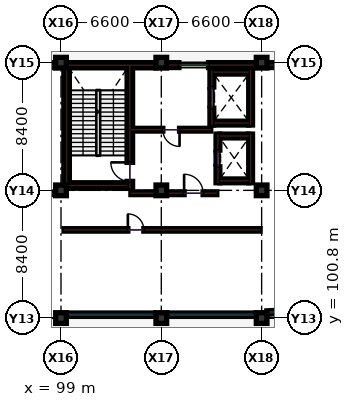
"""IFC4 building model, lengths in metres.
Left out: names, types, materials, properties, quantities, classifications, styles, units other than length and angle.
Written with IfcOpenShell. Run it as: python <this file> out.ifc"""

import sys

from ifc_helpers import new_model, si_unit, direction, frame, frame_2d, origin, origin_2d, place, context, subcontext, project, spatial, rectangle, extrude, element, fill, save


model = new_model("IFC4")
c1 = context("Model", 3, precision=1e-05, world=origin(), true_north=direction((0.0, 1.0)))
c2 = subcontext(c1, "Body", "Model", "MODEL_VIEW")
j1 = project(units=[si_unit("LENGTHUNIT", "METRE"), si_unit("PLANEANGLEUNIT", "RADIAN")], contexts=[c1])
p1 = place(None, origin())
s1 = spatial("IfcSite", under=j1, at=p1, CompositionType="ELEMENT")
p2 = place(p1, origin())
s2 = spatial("IfcBuilding", under=s1, at=p2, CompositionType="ELEMENT")
p3 = place(p2, origin())
s3 = spatial("IfcBuildingStorey", under=s2, at=p3, CompositionType="ELEMENT", Elevation=0.0)
for number, where, z_axis, x_axis in (
    (1, (99.0, 100.8, 0.0), (0.0, 0.0, 1.0), (1.0, 0.0, 0.0)),
    (2, (99.0, 109.2, 0.0), (0.0, 0.0, 1.0), (1.0, 0.0, 0.0)),
    (3, (99.0, 117.6, 0.0), (0.0, 0.0, 1.0), (1.0, 0.0, 0.0)),
    (4, (105.6, 100.8, 0.0), (0.0, 0.0, 1.0), (1.0, 0.0, 0.0)),
    (5, (105.6, 109.2, 0.0), (0.0, 0.0, 1.0), (1.0, 0.0, 0.0)),
    (6, (105.6, 117.6, 0.0), (0.0, 0.0, 1.0), (1.0, 0.0, 0.0)),
    (7, (112.2, 100.8, 0.0), (0.0, 0.0, 1.0), (1.0, 0.0, 0.0)),
    (8, (112.2, 109.2, 0.0), (0.0, 0.0, 1.0), (1.0, 0.0, 0.0)),
    (9, (112.2, 117.6, 0.0), (0.0, 0.0, 1.0), (1.0, 0.0, 0.0)),
):
    element("IfcColumn", number, at=place(p3, frame(where, z_axis=z_axis, x_axis=x_axis)), inside=s3, PredefinedType="COLUMN", context=c2, shape_type="SweptSolid", body=[
        extrude(rectangle(XDim=0.7, YDim=0.7, at=origin_2d()), origin(), (0.0, 0.0, 1.0), 5.4),
    ])
p4 = place(p3, frame((92.85, 109.0, 0.0), z_axis=(0.0, 0.0, 1.0), x_axis=(1.0, 0.0, 0.0)))
e10 = element("IfcWall", 10, at=p4, inside=s3, PredefinedType="PARTITIONING", context=c2, shape_type="SweptSolid", body=[
    extrude(rectangle(XDim=6.45, YDim=0.16, at=frame_2d((3.225, 0.0))), origin(), (0.0, 0.0, 1.0), 4.235),
])
p5 = place(p3, frame((99.2, 106.6, 0.0), z_axis=(0.0, 0.0, 1.0), x_axis=(1.0, 0.0, 0.0)))
e11 = element("IfcWall", 11, at=p5, inside=s3, PredefinedType="PARTITIONING", context=c2, shape_type="SweptSolid", body=[
    extrude(rectangle(XDim=12.9, YDim=0.16, at=frame_2d((6.45, 0.0))), origin(), (0.0, 0.0, 1.0), 4.25),
])
p6 = place(p5, frame((4.2, 0.0, 0.0)))
e12 = element("IfcOpeningElement", 12, at=p6, cuts=e11, PredefinedType="OPENING", context=c2, shape_type="SweptSolid", body=[
    extrude(rectangle(XDim=1.05, YDim=2.15, at=frame_2d((0.525, 1.075))), frame((0.0, 0.09, 0.0), z_axis=(0.0, -1.0, 0.0), x_axis=(1.0, 0.0, 0.0)), (0.0, 0.0, 1.0), 0.18),
])
p7 = place(p3, frame((98.655, 117.44, 0.0), z_axis=(0.0, 0.0, 1.0), x_axis=(-1.0, 0.0, 0.0)))
e13 = element("IfcWall", 13, at=p7, inside=s3, PredefinedType="SOLIDWALL", context=c2, shape_type="SweptSolid", body=[
    extrude(rectangle(XDim=5.91, YDim=0.32, at=frame_2d((2.955, 0.0))), origin(), (0.0, 0.0, 1.0), 4.385),
])
p8 = place(p7, frame((2.055, 0.0, 0.0)))
e14 = element("IfcOpeningElement", 14, at=p8, cuts=e13, PredefinedType="OPENING", context=c2, shape_type="SweptSolid", body=[
    extrude(rectangle(XDim=1.8, YDim=2.2, at=frame_2d((0.9, 1.1))), frame((0.0, 0.17, 0.0), z_axis=(0.0, -1.0, 0.0), x_axis=(1.0, 0.0, 0.0)), (0.0, 0.0, 1.0), 0.34),
])
p9 = place(p3, frame((105.255, 117.43, 0.0), z_axis=(0.0, 0.0, 1.0), x_axis=(-1.0, 0.0, 0.0)))
e15 = element("IfcWall", 15, at=p9, inside=s3, PredefinedType="SHEAR", context=c2, shape_type="SweptSolid", body=[
    extrude(rectangle(XDim=5.91, YDim=0.34, at=frame_2d((2.955, 0.0))), origin(), (0.0, 0.0, 1.0), 5.1),
])
p10 = place(p3, frame((111.855, 117.44, 0.0), z_axis=(0.0, 0.0, 1.0), x_axis=(-1.0, 0.0, 0.0)))
e16 = element("IfcWall", 16, at=p10, inside=s3, PredefinedType="SOLIDWALL", context=c2, shape_type="SweptSolid", body=[
    extrude(rectangle(XDim=5.91, YDim=0.32, at=frame_2d((2.955, 0.0))), origin(), (0.0, 0.0, 1.0), 4.385),
])
p11 = place(p10, frame((3.15, 0.0, 0.95)))
e17 = element("IfcOpeningElement", 17, at=p11, cuts=e16, PredefinedType="OPENING", context=c2, shape_type="SweptSolid", body=[
    extrude(rectangle(XDim=1.95, YDim=1.55, at=frame_2d((0.975, 0.775))), frame((0.0, 0.17, 0.0), z_axis=(0.0, -1.0, 0.0), x_axis=(1.0, 0.0, 0.0)), (0.0, 0.0, 1.0), 0.34),
])
p12 = place(p3, frame((118.455, 117.44, 0.0), z_axis=(0.0, 0.0, 1.0), x_axis=(-1.0, 0.0, 0.0)))
e18 = element("IfcWall", 18, at=p12, inside=s3, PredefinedType="SOLIDWALL", context=c2, shape_type="SweptSolid", body=[
    extrude(rectangle(XDim=5.91, YDim=0.32, at=frame_2d((2.955, 0.0))), origin(), (0.0, 0.0, 1.0), 4.385),
])
p13 = place(p12, frame((1.83, 0.0, 0.95)))
e19 = element("IfcOpeningElement", 19, at=p13, cuts=e18, PredefinedType="OPENING", context=c2, shape_type="SweptSolid", body=[
    extrude(rectangle(XDim=2.25, YDim=1.55, at=frame_2d((1.125, 0.775))), frame((0.0, 0.17, 0.0), z_axis=(0.0, -1.0, 0.0), x_axis=(1.0, 0.0, 0.0)), (0.0, 0.0, 1.0), 0.34),
])
p14 = place(p3, frame((99.5, 101.02, 0.0), z_axis=(0.0, 0.0, 1.0), x_axis=(1.0, 0.0, 0.0)))
e20 = element("IfcWall", 20, at=p14, inside=s3, PredefinedType="SOLIDWALL", context=c2, shape_type="SweptSolid", body=[
    extrude(rectangle(XDim=5.6, YDim=0.22, at=frame_2d((2.8, 0.0))), origin(), (0.0, 0.0, 1.0), 0.85),
])
p15 = place(p3, frame((106.1, 101.02, 0.0), z_axis=(0.0, 0.0, 1.0), x_axis=(1.0, 0.0, 0.0)))
e21 = element("IfcWall", 21, at=p15, inside=s3, PredefinedType="SOLIDWALL", context=c2, shape_type="SweptSolid", body=[
    extrude(rectangle(XDim=5.6, YDim=0.22, at=frame_2d((2.8, 0.0))), origin(), (0.0, 0.0, 1.0), 0.85),
])
p16 = place(p3, frame((112.55, 101.165, 0.0), z_axis=(0.0, 0.0, 1.0), x_axis=(0.998952546821, 0.045758159928, 0.0)))
e22 = element("IfcWall", 22, at=p16, inside=s3, PredefinedType="SOLIDWALL", context=c2, shape_type="SweptSolid", body=[
    extrude(rectangle(XDim=4.044, YDim=0.22, at=frame_2d((2.022, 0.0))), origin(), (0.0, 0.0, 1.0), 0.85),
])
p17 = place(p3, frame((99.37, 109.34, 0.0), z_axis=(0.0, 0.0, 1.0), x_axis=(0.0, 1.0, 0.0)))
e23 = element("IfcWall", 23, at=p17, inside=s3, PredefinedType="SHEAR", context=c2, shape_type="SweptSolid", body=[
    extrude(rectangle(XDim=8.09, YDim=0.36, at=frame_2d((4.045, 0.0))), origin(), (0.0, 0.0, 1.0), 5.1),
])
p18 = place(p3, frame((103.53, 109.34, 0.0), z_axis=(0.0, 0.0, 1.0), x_axis=(0.0, 1.0, 0.0)))
e24 = element("IfcWall", 24, at=p18, inside=s3, PredefinedType="SHEAR", context=c2, shape_type="SweptSolid", body=[
    extrude(rectangle(XDim=8.09, YDim=0.36, at=frame_2d((4.045, 0.0))), origin(), (0.0, 0.0, 1.0), 5.1),
])
p19 = place(p18, frame((0.45, 0.0, 0.0)))
e25 = element("IfcOpeningElement", 25, at=p19, cuts=e24, PredefinedType="OPENING", context=c2, shape_type="SweptSolid", body=[
    extrude(rectangle(XDim=1.25, YDim=2.15, at=frame_2d((0.625, 1.075))), frame((0.0, 0.19, 0.0), z_axis=(0.0, -1.0, 0.0), x_axis=(1.0, 0.0, 0.0)), (0.0, 0.0, 1.0), 0.38),
])
p20 = place(p3, frame((99.55, 109.52, 0.0), z_axis=(0.0, 0.0, 1.0), x_axis=(1.0, 0.0, 0.0)))
e26 = element("IfcWall", 26, at=p20, inside=s3, PredefinedType="SHEAR", context=c2, shape_type="SweptSolid", body=[
    extrude(rectangle(XDim=3.8, YDim=0.36, at=frame_2d((1.9, 0.0))), origin(), (0.0, 0.0, 1.0), 5.1),
])
p21 = place(p3, frame((109.325, 109.7, 0.0), z_axis=(0.0, 0.0, 1.0), x_axis=(0.0, 1.0, 0.0)))
e27 = element("IfcWall", 27, at=p21, inside=s3, PredefinedType="SHEAR", context=c2, shape_type="SweptSolid", body=[
    extrude(rectangle(XDim=3.2, YDim=0.25, at=frame_2d((1.6, 0.0))), origin(), (0.0, 0.0, 1.0), 5.1),
])
p22 = place(p21, frame((1.05, 0.0, 0.0)))
e28 = element("IfcOpeningElement", 28, at=p22, cuts=e27, PredefinedType="OPENING", context=c2, shape_type="SweptSolid", body=[
    extrude(rectangle(XDim=1.1, YDim=2.15, at=frame_2d((0.55, 1.075))), frame((0.0, 0.135, 0.0), z_axis=(0.0, -1.0, 0.0), x_axis=(1.0, 0.0, 0.0)), (0.0, 0.0, 1.0), 0.27),
])
p23 = place(p3, frame((111.475, 109.7, 0.0), z_axis=(0.0, 0.0, 1.0), x_axis=(0.0, 1.0, 0.0)))
e29 = element("IfcWall", 29, at=p23, inside=s3, PredefinedType="SHEAR", context=c2, shape_type="SweptSolid", body=[
    extrude(rectangle(XDim=3.2, YDim=0.25, at=frame_2d((1.6, 0.0))), origin(), (0.0, 0.0, 1.0), 5.1),
])
for number, where, z_axis, x_axis in (
    (30, (109.45, 109.825, 0.0), (0.0, 0.0, 1.0), (1.0, 0.0, 0.0)),
    (31, (109.45, 112.775, 0.0), (0.0, 0.0, 1.0), (1.0, 0.0, 0.0)),
):
    element("IfcWall", number, at=place(p3, frame(where, z_axis=z_axis, x_axis=x_axis)), inside=s3, PredefinedType="SHEAR", context=c2, shape_type="SweptSolid", body=[
        extrude(rectangle(XDim=1.9, YDim=0.25, at=frame_2d((0.95, 0.0))), origin(), (0.0, 0.0, 1.0), 5.1),
    ])
p24 = place(p3, frame((108.925, 113.5, 0.0), z_axis=(0.0, 0.0, 1.0), x_axis=(0.0, 1.0, 0.0)))
e32 = element("IfcWall", 32, at=p24, inside=s3, PredefinedType="SHEAR", context=c2, shape_type="SweptSolid", body=[
    extrude(rectangle(XDim=3.6, YDim=0.25, at=frame_2d((1.8, 0.0))), origin(), (0.0, 0.0, 1.0), 5.1),
])
p25 = place(p24, frame((1.1, 0.0, 0.0)))
e33 = element("IfcOpeningElement", 33, at=p25, cuts=e32, PredefinedType="OPENING", context=c2, shape_type="SweptSolid", body=[
    extrude(rectangle(XDim=1.4, YDim=2.2, at=frame_2d((0.7, 1.1))), frame((0.0, 0.135, 0.0), z_axis=(0.0, -1.0, 0.0), x_axis=(1.0, 0.0, 0.0)), (0.0, 0.0, 1.0), 0.27),
])
p26 = place(p3, frame((111.475, 113.5, 0.0), z_axis=(0.0, 0.0, 1.0), x_axis=(0.0, 1.0, 0.0)))
e34 = element("IfcWall", 34, at=p26, inside=s3, PredefinedType="SHEAR", context=c2, shape_type="SweptSolid", body=[
    extrude(rectangle(XDim=3.6, YDim=0.25, at=frame_2d((1.8, 0.0))), origin(), (0.0, 0.0, 1.0), 5.1),
])
for number, where, z_axis, x_axis in (
    (35, (109.05, 113.625, 0.0), (0.0, 0.0, 1.0), (1.0, 0.0, 0.0)),
    (36, (109.05, 116.975, 0.0), (0.0, 0.0, 1.0), (1.0, 0.0, 0.0)),
):
    element("IfcWall", number, at=place(p3, frame(where, z_axis=z_axis, x_axis=x_axis)), inside=s3, PredefinedType="SHEAR", context=c2, shape_type="SweptSolid", body=[
        extrude(rectangle(XDim=2.3, YDim=0.25, at=frame_2d((1.15, 0.0))), origin(), (0.0, 0.0, 1.0), 5.1),
    ])
p27 = place(p3, frame((103.6, 109.01, 0.0), z_axis=(0.0, 0.0, 1.0), x_axis=(1.0, 0.0, 0.0)))
e37 = element("IfcWall", 37, at=p27, inside=s3, PredefinedType="SOLIDWALL", context=c2, shape_type="SweptSolid", body=[
    extrude(rectangle(XDim=1.65, YDim=0.18, at=frame_2d((0.825, 0.0))), origin(), (0.0, 0.0, 1.0), 4.235),
])
p28 = place(p3, frame((105.95, 109.01, 0.0), z_axis=(0.0, 0.0, 1.0), x_axis=(1.0, 0.0, 0.0)))
e38 = element("IfcWall", 38, at=p28, inside=s3, PredefinedType="SOLIDWALL", context=c2, shape_type="SweptSolid", body=[
    extrude(rectangle(XDim=3.3, YDim=0.18, at=frame_2d((1.65, 0.0))), origin(), (0.0, 0.0, 1.0), 4.235),
])
p29 = place(p28, frame((1.15, 0.0, 0.0)))
e39 = element("IfcOpeningElement", 39, at=p29, cuts=e38, PredefinedType="OPENING", context=c2, shape_type="SweptSolid", body=[
    extrude(rectangle(XDim=1.25, YDim=2.15, at=frame_2d((0.625, 1.075))), frame((0.0, 0.1, 0.0), z_axis=(0.0, -1.0, 0.0), x_axis=(1.0, 0.0, 0.0)), (0.0, 0.0, 1.0), 0.2),
])
p30 = place(p3, frame((103.6, 113.19, 0.0), z_axis=(0.0, 0.0, 1.0), x_axis=(1.0, 0.0, 0.0)))
e40 = element("IfcWall", 40, at=p30, inside=s3, PredefinedType="SOLIDWALL", context=c2, shape_type="SweptSolid", body=[
    extrude(rectangle(XDim=5.25, YDim=0.18, at=frame_2d((2.625, 0.0))), origin(), (0.0, 0.0, 1.0), 5.1),
])
p31 = place(p30, frame((2.1, 0.0, 0.0)))
e41 = element("IfcOpeningElement", 41, at=p31, cuts=e40, PredefinedType="OPENING", context=c2, shape_type="SweptSolid", body=[
    extrude(rectangle(XDim=1.1, YDim=2.15, at=frame_2d((0.55, 1.075))), frame((0.0, 0.1, 0.0), z_axis=(0.0, -1.0, 0.0), x_axis=(1.0, 0.0, 0.0)), (0.0, 0.0, 1.0), 0.2),
])
p32 = place(p6, origin())
e42 = element("IfcDoor", 42, at=p32, inside=s3, OperationType="SINGLE_SWING_LEFT", PredefinedType="DOOR", context=c2, shape_type="SweptSolid", body=[
    extrude(rectangle(XDim=1.05, YDim=2.15, at=frame_2d((0.525, 1.075))), frame((0.0, 0.025, 0.0), z_axis=(0.0, -1.0, 0.0), x_axis=(1.0, 0.0, 0.0)), (0.0, 0.0, 1.0), 0.05),
])
fill(e12, e42)
p33 = place(p11, origin())
e43 = element("IfcWindow", 43, at=p33, inside=s3, PartitioningType="SINGLE_PANEL", PredefinedType="WINDOW", context=c2, shape_type="SweptSolid", body=[
    extrude(rectangle(XDim=1.95, YDim=1.55, at=frame_2d((0.975, 0.775))), frame((0.0, 0.03, 0.0), z_axis=(0.0, -1.0, 0.0), x_axis=(1.0, 0.0, 0.0)), (0.0, 0.0, 1.0), 0.06),
])
fill(e17, e43)
p34 = place(p19, origin())
e44 = element("IfcDoor", 44, at=p34, inside=s3, OperationType="SINGLE_SWING_RIGHT", PredefinedType="DOOR", context=c2, shape_type="SweptSolid", body=[
    extrude(rectangle(XDim=1.25, YDim=2.15, at=frame_2d((0.625, 1.075))), frame((0.0, 0.025, 0.0), z_axis=(0.0, -1.0, 0.0), x_axis=(1.0, 0.0, 0.0)), (0.0, 0.0, 1.0), 0.05),
])
fill(e25, e44)
p35 = place(p22, origin())
e45 = element("IfcDoor", 45, at=p35, inside=s3, OperationType="SLIDING_TO_LEFT", PredefinedType="DOOR", context=c2, shape_type="SweptSolid", body=[
    extrude(rectangle(XDim=1.1, YDim=2.15, at=frame_2d((0.55, 1.075))), frame((0.0, 0.025, 0.0), z_axis=(0.0, -1.0, 0.0), x_axis=(1.0, 0.0, 0.0)), (0.0, 0.0, 1.0), 0.05),
])
fill(e28, e45)
p36 = place(p25, origin())
e46 = element("IfcDoor", 46, at=p36, inside=s3, OperationType="SLIDING_TO_LEFT", PredefinedType="DOOR", context=c2, shape_type="SweptSolid", body=[
    extrude(rectangle(XDim=1.4, YDim=2.2, at=frame_2d((0.7, 1.1))), frame((0.0, 0.025, 0.0), z_axis=(0.0, -1.0, 0.0), x_axis=(1.0, 0.0, 0.0)), (0.0, 0.0, 1.0), 0.05),
])
fill(e33, e46)
p37 = place(p29, origin())
e47 = element("IfcDoor", 47, at=p37, inside=s3, OperationType="SINGLE_SWING_LEFT", PredefinedType="DOOR", context=c2, shape_type="SweptSolid", body=[
    extrude(rectangle(XDim=1.25, YDim=2.15, at=frame_2d((0.625, 1.075))), frame((0.0, 0.025, 0.0), z_axis=(0.0, -1.0, 0.0), x_axis=(1.0, 0.0, 0.0)), (0.0, 0.0, 1.0), 0.05),
])
fill(e39, e47)
p38 = place(p31, frame((1.1, 0.0, 0.0), z_axis=(0.0, 0.0, 1.0), x_axis=(-1.0, 0.0, 0.0)))
e48 = element("IfcDoor", 48, at=p38, inside=s3, OperationType="SINGLE_SWING_RIGHT", PredefinedType="DOOR", context=c2, shape_type="SweptSolid", body=[
    extrude(rectangle(XDim=1.1, YDim=2.15, at=frame_2d((0.55, 1.075))), frame((0.0, 0.025, 0.0), z_axis=(0.0, -1.0, 0.0), x_axis=(1.0, 0.0, 0.0)), (0.0, 0.0, 1.0), 0.05),
])
fill(e41, e48)
save(model, sys.argv[1])
